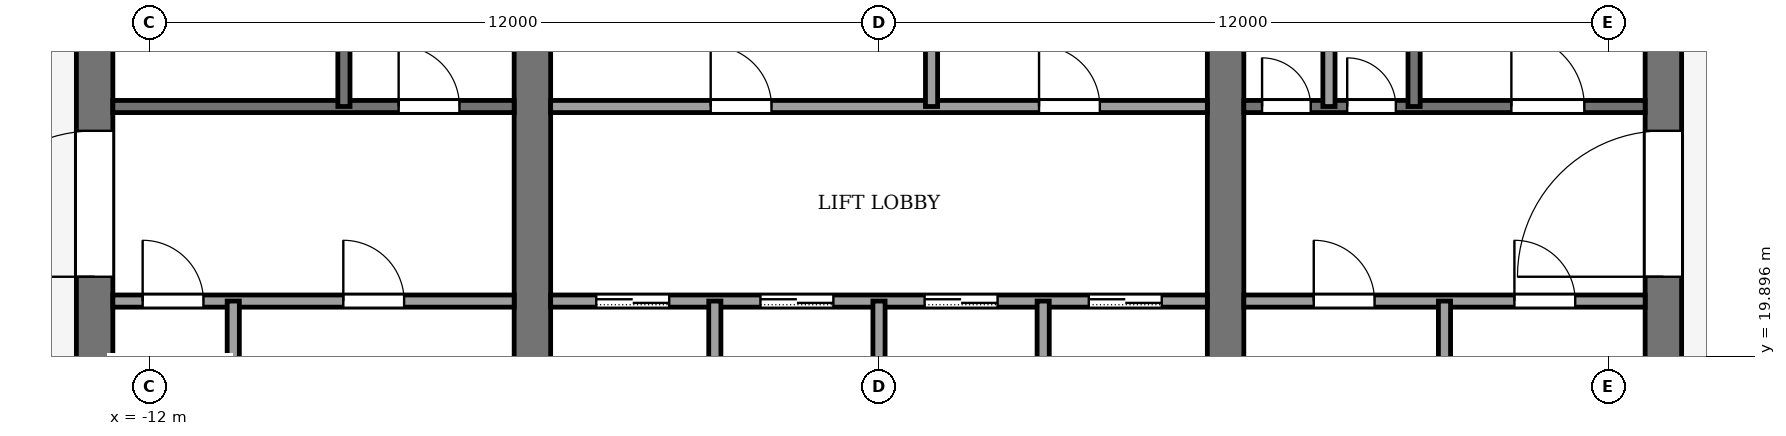
"""IFC4 building model, lengths in metres.
Left out: names, types, materials, properties, quantities, classifications, styles, units other than length and angle.
Written with IfcOpenShell. Run it as: python <this file> out.ifc"""

import sys

from ifc_helpers import new_model, si_unit, direction, frame, frame_2d, origin, place, context, subcontext, project, spatial, rectangle, extrude, element, fill, save


model = new_model("IFC4")
c1 = context("Model", 3, precision=1e-05, world=origin(), true_north=direction((0.0, 1.0)))
c2 = subcontext(c1, "Body", "Model", "MODEL_VIEW")
j1 = project(units=[si_unit("LENGTHUNIT", "METRE"), si_unit("PLANEANGLEUNIT", "RADIAN")], contexts=[c1])
p1 = place(None, origin())
s1 = spatial("IfcSite", under=j1, at=p1, CompositionType="ELEMENT")
p2 = place(p1, origin())
s2 = spatial("IfcBuilding", under=s1, at=p2, CompositionType="ELEMENT")
p3 = place(p2, frame((0.0, 0.0, 294.0)))
s3 = spatial("IfcBuildingStorey", under=s2, at=p3, CompositionType="ELEMENT", Elevation=294.0)
p4 = place(p3, frame((-12.9, 18.4, -0.13), z_axis=(0.0, 0.0, 1.0), x_axis=(0.0, 1.0, 0.0)))
e1 = element("IfcWall", 1, at=p4, inside=s3, PredefinedType="SHEAR", context=c2, shape_type="SweptSolid", body=[
    extrude(rectangle(XDim=19.2, YDim=0.6, at=frame_2d((9.6, 0.0))), origin(), (0.0, 0.0, 1.0), 4.0),
])
p5 = place(p4, frame((2.8, 0.0, 0.13)))
e2 = element("IfcOpeningElement", 2, at=p5, cuts=e1, PredefinedType="OPENING", context=c2, shape_type="SweptSolid", body=[
    extrude(rectangle(XDim=2.4, YDim=2.4, at=frame_2d((1.2, 1.2))), frame((0.0, 0.31, 0.0), z_axis=(0.0, -1.0, 0.0), x_axis=(1.0, 0.0, 0.0)), (0.0, 0.0, 1.0), 0.62),
])
p6 = place(p4, frame((13.4, 0.0, 0.13)))
e3 = element("IfcOpeningElement", 3, at=p6, cuts=e1, PredefinedType="OPENING", context=c2, shape_type="SweptSolid", body=[
    extrude(rectangle(XDim=1.4, YDim=2.2, at=frame_2d((0.7, 1.1))), frame((0.0, 0.31, 0.0), z_axis=(0.0, -1.0, 0.0), x_axis=(1.0, 0.0, 0.0)), (0.0, 0.0, 1.0), 0.62),
])
p7 = place(p3, frame((12.9, 18.4, -0.13), z_axis=(0.0, 0.0, 1.0), x_axis=(0.0, 1.0, 0.0)))
e4 = element("IfcWall", 4, at=p7, inside=s3, PredefinedType="SHEAR", context=c2, shape_type="SweptSolid", body=[
    extrude(rectangle(XDim=19.2, YDim=0.6, at=frame_2d((9.6, 0.0))), origin(), (0.0, 0.0, 1.0), 4.0),
])
p8 = place(p7, frame((2.8, 0.0, 0.13)))
e5 = element("IfcOpeningElement", 5, at=p8, cuts=e4, PredefinedType="OPENING", context=c2, shape_type="SweptSolid", body=[
    extrude(rectangle(XDim=2.4, YDim=2.4, at=frame_2d((1.2, 1.2))), frame((0.0, 0.31, 0.0), z_axis=(0.0, -1.0, 0.0), x_axis=(1.0, 0.0, 0.0)), (0.0, 0.0, 1.0), 0.62),
])
p9 = place(p7, frame((13.3, 0.0, 0.13)))
e6 = element("IfcOpeningElement", 6, at=p9, cuts=e4, PredefinedType="OPENING", context=c2, shape_type="SweptSolid", body=[
    extrude(rectangle(XDim=2.4, YDim=2.4, at=frame_2d((1.2, 1.2))), frame((0.0, 0.31, 0.0), z_axis=(0.0, -1.0, 0.0), x_axis=(1.0, 0.0, 0.0)), (0.0, 0.0, 1.0), 0.62),
])
p10 = place(p3, frame((-5.7, 18.4, -0.13), z_axis=(0.0, 0.0, 1.0), x_axis=(0.0, 1.0, 0.0)))
e7 = element("IfcWall", 7, at=p10, inside=s3, PredefinedType="SHEAR", context=c2, shape_type="SweptSolid", body=[
    extrude(rectangle(XDim=19.2, YDim=0.6, at=frame_2d((9.6, 0.0))), origin(), (0.0, 0.0, 1.0), 4.0),
])
p11 = place(p10, frame((8.35, 0.0, 0.13)))
e8 = element("IfcOpeningElement", 8, at=p11, cuts=e7, PredefinedType="OPENING", context=c2, shape_type="SweptSolid", body=[
    extrude(rectangle(XDim=0.9, YDim=2.1, at=frame_2d((0.45, 1.05))), frame((0.0, 0.31, 0.0), z_axis=(0.0, -1.0, 0.0), x_axis=(1.0, 0.0, 0.0)), (0.0, 0.0, 1.0), 0.62),
])
p12 = place(p3, frame((5.7, 18.4, -0.13), z_axis=(0.0, 0.0, 1.0), x_axis=(0.0, 1.0, 0.0)))
e9 = element("IfcWall", 9, at=p12, inside=s3, PredefinedType="SHEAR", context=c2, shape_type="SweptSolid", body=[
    extrude(rectangle(XDim=19.2, YDim=0.6, at=frame_2d((9.6, 0.0))), origin(), (0.0, 0.0, 1.0), 4.0),
])
p13 = place(p12, frame((13.3, 0.0, 0.13)))
e10 = element("IfcOpeningElement", 10, at=p13, cuts=e9, PredefinedType="OPENING", context=c2, shape_type="SweptSolid", body=[
    extrude(rectangle(XDim=2.4, YDim=2.4, at=frame_2d((1.2, 1.2))), frame((0.0, 0.31, 0.0), z_axis=(0.0, -1.0, 0.0), x_axis=(1.0, 0.0, 0.0)), (0.0, 0.0, 1.0), 0.62),
])
p14 = place(p3, frame((-12.6, 20.8, 0.0), z_axis=(0.0, 0.0, 1.0), x_axis=(1.0, 0.0, 0.0)))
e11 = element("IfcWall", 11, at=p14, inside=s3, PredefinedType="PARTITIONING", context=c2, shape_type="SweptSolid", body=[
    extrude(rectangle(XDim=6.6, YDim=0.2, at=frame_2d((3.3, 0.0))), origin(), (0.0, 0.0, 1.0), 3.87),
])
p15 = place(p14, frame((0.49, 0.0, 0.0)))
e12 = element("IfcOpeningElement", 12, at=p15, cuts=e11, PredefinedType="OPENING", context=c2, shape_type="SweptSolid", body=[
    extrude(rectangle(XDim=1.0, YDim=2.1, at=frame_2d((0.5, 1.05))), frame((0.0, 0.11, 0.0), z_axis=(0.0, -1.0, 0.0), x_axis=(1.0, 0.0, 0.0)), (0.0, 0.0, 1.0), 0.22),
])
p16 = place(p14, frame((3.79, 0.0, 0.0)))
e13 = element("IfcOpeningElement", 13, at=p16, cuts=e11, PredefinedType="OPENING", context=c2, shape_type="SweptSolid", body=[
    extrude(rectangle(XDim=1.0, YDim=2.1, at=frame_2d((0.5, 1.05))), frame((0.0, 0.11, 0.0), z_axis=(0.0, -1.0, 0.0), x_axis=(1.0, 0.0, 0.0)), (0.0, 0.0, 1.0), 0.22),
])
p17 = place(p3, frame((-5.4, 20.8, 0.0), z_axis=(0.0, 0.0, 1.0), x_axis=(1.0, 0.0, 0.0)))
e14 = element("IfcWall", 14, at=p17, inside=s3, PredefinedType="PARTITIONING", context=c2, shape_type="SweptSolid", body=[
    extrude(rectangle(XDim=10.8, YDim=0.2, at=frame_2d((5.4, 0.0))), origin(), (0.0, 0.0, 1.0), 3.87),
])
p18 = place(p17, frame((0.75, 0.0, 0.0)))
e15 = element("IfcOpeningElement", 15, at=p18, cuts=e14, PredefinedType="OPENING", context=c2, shape_type="SweptSolid", body=[
    extrude(rectangle(XDim=1.2, YDim=2.2, at=frame_2d((0.6, 1.1))), frame((0.0, 0.11, 0.0), z_axis=(0.0, -1.0, 0.0), x_axis=(1.0, 0.0, 0.0)), (0.0, 0.0, 1.0), 0.22),
])
p19 = place(p17, frame((3.45, 0.0, 0.0)))
e16 = element("IfcOpeningElement", 16, at=p19, cuts=e14, PredefinedType="OPENING", context=c2, shape_type="SweptSolid", body=[
    extrude(rectangle(XDim=1.2, YDim=2.2, at=frame_2d((0.6, 1.1))), frame((0.0, 0.11, 0.0), z_axis=(0.0, -1.0, 0.0), x_axis=(1.0, 0.0, 0.0)), (0.0, 0.0, 1.0), 0.22),
])
p20 = place(p17, frame((6.15, 0.0, 0.0)))
e17 = element("IfcOpeningElement", 17, at=p20, cuts=e14, PredefinedType="OPENING", context=c2, shape_type="SweptSolid", body=[
    extrude(rectangle(XDim=1.2, YDim=2.2, at=frame_2d((0.6, 1.1))), frame((0.0, 0.11, 0.0), z_axis=(0.0, -1.0, 0.0), x_axis=(1.0, 0.0, 0.0)), (0.0, 0.0, 1.0), 0.22),
])
p21 = place(p17, frame((8.85, 0.0, 0.0)))
e18 = element("IfcOpeningElement", 18, at=p21, cuts=e14, PredefinedType="OPENING", context=c2, shape_type="SweptSolid", body=[
    extrude(rectangle(XDim=1.2, YDim=2.2, at=frame_2d((0.6, 1.1))), frame((0.0, 0.11, 0.0), z_axis=(0.0, -1.0, 0.0), x_axis=(1.0, 0.0, 0.0)), (0.0, 0.0, 1.0), 0.22),
])
p22 = place(p3, frame((6.0, 20.8, 0.0), z_axis=(0.0, 0.0, 1.0), x_axis=(1.0, 0.0, 0.0)))
e19 = element("IfcWall", 19, at=p22, inside=s3, PredefinedType="PARTITIONING", context=c2, shape_type="SweptSolid", body=[
    extrude(rectangle(XDim=6.6, YDim=0.2, at=frame_2d((3.3, 0.0))), origin(), (0.0, 0.0, 1.0), 3.87),
])
p23 = place(p22, frame((1.15, 0.0, 0.0)))
e20 = element("IfcOpeningElement", 20, at=p23, cuts=e19, PredefinedType="OPENING", context=c2, shape_type="SweptSolid", body=[
    extrude(rectangle(XDim=1.0, YDim=2.1, at=frame_2d((0.5, 1.05))), frame((0.0, 0.11, 0.0), z_axis=(0.0, -1.0, 0.0), x_axis=(1.0, 0.0, 0.0)), (0.0, 0.0, 1.0), 0.22),
])
p24 = place(p22, frame((4.45, 0.0, 0.0)))
e21 = element("IfcOpeningElement", 21, at=p24, cuts=e19, PredefinedType="OPENING", context=c2, shape_type="SweptSolid", body=[
    extrude(rectangle(XDim=1.0, YDim=2.1, at=frame_2d((0.5, 1.05))), frame((0.0, 0.11, 0.0), z_axis=(0.0, -1.0, 0.0), x_axis=(1.0, 0.0, 0.0)), (0.0, 0.0, 1.0), 0.22),
])
p25 = place(p3, frame((-12.6, 24.0, 0.0), z_axis=(0.0, 0.0, 1.0), x_axis=(1.0, 0.0, 0.0)))
e22 = element("IfcWall", 22, at=p25, inside=s3, PredefinedType="PARTITIONING", context=c2, shape_type="SweptSolid", body=[
    extrude(rectangle(XDim=6.6, YDim=0.2, at=frame_2d((3.3, 0.0))), origin(), (0.0, 0.0, 1.0), 3.87),
])
p26 = place(p25, frame((4.7, 0.0, 0.0)))
e23 = element("IfcOpeningElement", 23, at=p26, cuts=e22, PredefinedType="OPENING", context=c2, shape_type="SweptSolid", body=[
    extrude(rectangle(XDim=1.0, YDim=2.1, at=frame_2d((0.5, 1.05))), frame((0.0, 0.11, 0.0), z_axis=(0.0, -1.0, 0.0), x_axis=(1.0, 0.0, 0.0)), (0.0, 0.0, 1.0), 0.22),
])
p27 = place(p3, frame((-5.4, 24.0, 0.0), z_axis=(0.0, 0.0, 1.0), x_axis=(1.0, 0.0, 0.0)))
e24 = element("IfcWall", 24, at=p27, inside=s3, PredefinedType="PARTITIONING", context=c2, shape_type="SweptSolid", body=[
    extrude(rectangle(XDim=10.8, YDim=0.2, at=frame_2d((5.4, 0.0))), origin(), (0.0, 0.0, 1.0), 3.87),
])
p28 = place(p27, frame((2.632, 0.0, 0.0)))
e25 = element("IfcOpeningElement", 25, at=p28, cuts=e24, PredefinedType="OPENING", context=c2, shape_type="SweptSolid", body=[
    extrude(rectangle(XDim=1.0, YDim=2.1, at=frame_2d((0.5, 1.05))), frame((0.0, 0.11, 0.0), z_axis=(0.0, -1.0, 0.0), x_axis=(1.0, 0.0, 0.0)), (0.0, 0.0, 1.0), 0.22),
])
p29 = place(p27, frame((8.032, 0.0, 0.0)))
e26 = element("IfcOpeningElement", 26, at=p29, cuts=e24, PredefinedType="OPENING", context=c2, shape_type="SweptSolid", body=[
    extrude(rectangle(XDim=1.0, YDim=2.1, at=frame_2d((0.5, 1.05))), frame((0.0, 0.11, 0.0), z_axis=(0.0, -1.0, 0.0), x_axis=(1.0, 0.0, 0.0)), (0.0, 0.0, 1.0), 0.22),
])
p30 = place(p3, frame((6.0, 24.0, 0.0), z_axis=(0.0, 0.0, 1.0), x_axis=(1.0, 0.0, 0.0)))
e27 = element("IfcWall", 27, at=p30, inside=s3, PredefinedType="PARTITIONING", context=c2, shape_type="SweptSolid", body=[
    extrude(rectangle(XDim=6.6, YDim=0.2, at=frame_2d((3.3, 0.0))), origin(), (0.0, 0.0, 1.0), 3.87),
])
p31 = place(p30, frame((0.3, 0.0, 0.0)))
e28 = element("IfcOpeningElement", 28, at=p31, cuts=e27, PredefinedType="OPENING", context=c2, shape_type="SweptSolid", body=[
    extrude(rectangle(XDim=0.8, YDim=2.1, at=frame_2d((0.4, 1.05))), frame((0.0, 0.11, 0.0), z_axis=(0.0, -1.0, 0.0), x_axis=(1.0, 0.0, 0.0)), (0.0, 0.0, 1.0), 0.22),
])
p32 = place(p30, frame((1.7, 0.0, 0.0)))
e29 = element("IfcOpeningElement", 29, at=p32, cuts=e27, PredefinedType="OPENING", context=c2, shape_type="SweptSolid", body=[
    extrude(rectangle(XDim=0.8, YDim=2.1, at=frame_2d((0.4, 1.05))), frame((0.0, 0.11, 0.0), z_axis=(0.0, -1.0, 0.0), x_axis=(1.0, 0.0, 0.0)), (0.0, 0.0, 1.0), 0.22),
])
p33 = place(p30, frame((4.4, 0.0, 0.0)))
e30 = element("IfcOpeningElement", 30, at=p33, cuts=e27, PredefinedType="OPENING", context=c2, shape_type="SweptSolid", body=[
    extrude(rectangle(XDim=1.2, YDim=2.2, at=frame_2d((0.6, 1.1))), frame((0.0, 0.11, 0.0), z_axis=(0.0, -1.0, 0.0), x_axis=(1.0, 0.0, 0.0)), (0.0, 0.0, 1.0), 0.22),
])
p34 = place(p3, frame((-10.62, 18.4, 0.0), z_axis=(0.0, 0.0, 1.0), x_axis=(0.0, 1.0, 0.0)))
e31 = element("IfcWall", 31, at=p34, inside=s3, PredefinedType="PARTITIONING", context=c2, shape_type="SweptSolid", body=[
    extrude(rectangle(XDim=2.4, YDim=0.2, at=frame_2d((1.2, 0.0))), origin(), (0.0, 0.0, 1.0), 3.87),
])
p35 = place(p3, frame((-8.8, 24.0, 0.0), z_axis=(0.0, 0.0, 1.0), x_axis=(0.0, 1.0, 0.0)))
e32 = element("IfcWall", 32, at=p35, inside=s3, PredefinedType="PARTITIONING", context=c2, shape_type="SweptSolid", body=[
    extrude(rectangle(XDim=7.4, YDim=0.2, at=frame_2d((3.7, 0.0))), origin(), (0.0, 0.0, 1.0), 3.87),
])
for number, where, z_axis, x_axis in (
    (33, (-2.7, 18.4, 0.0), (0.0, 0.0, 1.0), (0.0, 1.0, 0.0)),
    (34, (0.0, 18.4, 0.0), (0.0, 0.0, 1.0), (0.0, 1.0, 0.0)),
):
    element("IfcWall", number, at=place(p3, frame(where, z_axis=z_axis, x_axis=x_axis)), inside=s3, PredefinedType="PARTITIONING", context=c2, shape_type="SweptSolid", body=[
        extrude(rectangle(XDim=2.4, YDim=0.2, at=frame_2d((1.2, 0.0))), origin(), (0.0, 0.0, 1.0), 3.87),
    ])
p36 = place(p3, frame((0.864, 24.0, 0.0), z_axis=(0.0, 0.0, 1.0), x_axis=(0.0, 1.0, 0.0)))
e35 = element("IfcWall", 35, at=p36, inside=s3, PredefinedType="PARTITIONING", context=c2, shape_type="SweptSolid", body=[
    extrude(rectangle(XDim=2.4, YDim=0.2, at=frame_2d((1.2, 0.0))), origin(), (0.0, 0.0, 1.0), 3.87),
])
p37 = place(p3, frame((2.7, 18.4, 0.0), z_axis=(0.0, 0.0, 1.0), x_axis=(0.0, 1.0, 0.0)))
e36 = element("IfcWall", 36, at=p37, inside=s3, PredefinedType="PARTITIONING", context=c2, shape_type="SweptSolid", body=[
    extrude(rectangle(XDim=2.4, YDim=0.2, at=frame_2d((1.2, 0.0))), origin(), (0.0, 0.0, 1.0), 3.87),
])
for number, where, z_axis, x_axis in (
    (37, (7.4, 24.0, 0.0), (0.0, 0.0, 1.0), (0.0, 1.0, 0.0)),
    (38, (8.8, 24.0, 0.0), (0.0, 0.0, 1.0), (0.0, 1.0, 0.0)),
):
    element("IfcWall", number, at=place(p3, frame(where, z_axis=z_axis, x_axis=x_axis)), inside=s3, PredefinedType="PARTITIONING", context=c2, shape_type="SweptSolid", body=[
        extrude(rectangle(XDim=7.4, YDim=0.2, at=frame_2d((3.7, 0.0))), origin(), (0.0, 0.0, 1.0), 3.87),
    ])
p38 = place(p3, frame((9.3, 18.4, 0.0), z_axis=(0.0, 0.0, 1.0), x_axis=(0.0, 1.0, 0.0)))
e39 = element("IfcWall", 39, at=p38, inside=s3, PredefinedType="PARTITIONING", context=c2, shape_type="SweptSolid", body=[
    extrude(rectangle(XDim=2.4, YDim=0.2, at=frame_2d((1.2, 0.0))), origin(), (0.0, 0.0, 1.0), 3.87),
])
p39 = place(p18, origin())
e40 = element("IfcDoor", 40, at=p39, inside=s3, OperationType="SLIDING_TO_LEFT", PredefinedType="DOOR", context=c2, shape_type="SweptSolid", body=[
    extrude(rectangle(XDim=1.2, YDim=2.2, at=frame_2d((0.6, 1.1))), frame((0.0, 0.025, 0.0), z_axis=(0.0, -1.0, 0.0), x_axis=(1.0, 0.0, 0.0)), (0.0, 0.0, 1.0), 0.05),
])
fill(e15, e40)
p40 = place(p19, origin())
e41 = element("IfcDoor", 41, at=p40, inside=s3, OperationType="SLIDING_TO_LEFT", PredefinedType="DOOR", context=c2, shape_type="SweptSolid", body=[
    extrude(rectangle(XDim=1.2, YDim=2.2, at=frame_2d((0.6, 1.1))), frame((0.0, 0.025, 0.0), z_axis=(0.0, -1.0, 0.0), x_axis=(1.0, 0.0, 0.0)), (0.0, 0.0, 1.0), 0.05),
])
fill(e16, e41)
p41 = place(p20, origin())
e42 = element("IfcDoor", 42, at=p41, inside=s3, OperationType="SLIDING_TO_LEFT", PredefinedType="DOOR", context=c2, shape_type="SweptSolid", body=[
    extrude(rectangle(XDim=1.2, YDim=2.2, at=frame_2d((0.6, 1.1))), frame((0.0, 0.025, 0.0), z_axis=(0.0, -1.0, 0.0), x_axis=(1.0, 0.0, 0.0)), (0.0, 0.0, 1.0), 0.05),
])
fill(e17, e42)
p42 = place(p21, origin())
e43 = element("IfcDoor", 43, at=p42, inside=s3, OperationType="SLIDING_TO_LEFT", PredefinedType="DOOR", context=c2, shape_type="SweptSolid", body=[
    extrude(rectangle(XDim=1.2, YDim=2.2, at=frame_2d((0.6, 1.1))), frame((0.0, 0.025, 0.0), z_axis=(0.0, -1.0, 0.0), x_axis=(1.0, 0.0, 0.0)), (0.0, 0.0, 1.0), 0.05),
])
fill(e18, e43)
p43 = place(p28, origin())
e44 = element("IfcDoor", 44, at=p43, inside=s3, OperationType="SINGLE_SWING_LEFT", PredefinedType="DOOR", context=c2, shape_type="SweptSolid", body=[
    extrude(rectangle(XDim=1.0, YDim=2.1, at=frame_2d((0.5, 1.05))), frame((0.0, 0.025, 0.0), z_axis=(0.0, -1.0, 0.0), x_axis=(1.0, 0.0, 0.0)), (0.0, 0.0, 1.0), 0.05),
])
fill(e25, e44)
p44 = place(p29, origin())
e45 = element("IfcDoor", 45, at=p44, inside=s3, OperationType="SINGLE_SWING_RIGHT", PredefinedType="DOOR", context=c2, shape_type="SweptSolid", body=[
    extrude(rectangle(XDim=1.0, YDim=2.1, at=frame_2d((0.5, 1.05))), frame((0.0, 0.025, 0.0), z_axis=(0.0, -1.0, 0.0), x_axis=(1.0, 0.0, 0.0)), (0.0, 0.0, 1.0), 0.05),
])
fill(e26, e45)
p45 = place(p15, origin())
e46 = element("IfcDoor", 46, at=p45, inside=s3, OperationType="SINGLE_SWING_RIGHT", PredefinedType="DOOR", context=c2, shape_type="SweptSolid", body=[
    extrude(rectangle(XDim=1.0, YDim=2.1, at=frame_2d((0.5, 1.05))), frame((0.0, 0.025, 0.0), z_axis=(0.0, -1.0, 0.0), x_axis=(1.0, 0.0, 0.0)), (0.0, 0.0, 1.0), 0.05),
])
fill(e12, e46)
p46 = place(p16, origin())
e47 = element("IfcDoor", 47, at=p46, inside=s3, OperationType="SINGLE_SWING_RIGHT", PredefinedType="DOOR", context=c2, shape_type="SweptSolid", body=[
    extrude(rectangle(XDim=1.0, YDim=2.1, at=frame_2d((0.5, 1.05))), frame((0.0, 0.025, 0.0), z_axis=(0.0, -1.0, 0.0), x_axis=(1.0, 0.0, 0.0)), (0.0, 0.0, 1.0), 0.05),
])
fill(e13, e47)
p47 = place(p23, origin())
e48 = element("IfcDoor", 48, at=p47, inside=s3, OperationType="SINGLE_SWING_LEFT", PredefinedType="DOOR", context=c2, shape_type="SweptSolid", body=[
    extrude(rectangle(XDim=1.0, YDim=2.1, at=frame_2d((0.5, 1.05))), frame((0.0, 0.025, 0.0), z_axis=(0.0, -1.0, 0.0), x_axis=(1.0, 0.0, 0.0)), (0.0, 0.0, 1.0), 0.05),
])
fill(e20, e48)
p48 = place(p24, origin())
e49 = element("IfcDoor", 49, at=p48, inside=s3, OperationType="SINGLE_SWING_LEFT", PredefinedType="DOOR", context=c2, shape_type="SweptSolid", body=[
    extrude(rectangle(XDim=1.0, YDim=2.1, at=frame_2d((0.5, 1.05))), frame((0.0, 0.025, 0.0), z_axis=(0.0, -1.0, 0.0), x_axis=(1.0, 0.0, 0.0)), (0.0, 0.0, 1.0), 0.05),
])
fill(e21, e49)
p49 = place(p26, origin())
e50 = element("IfcDoor", 50, at=p49, inside=s3, OperationType="SINGLE_SWING_RIGHT", PredefinedType="DOOR", context=c2, shape_type="SweptSolid", body=[
    extrude(rectangle(XDim=1.0, YDim=2.1, at=frame_2d((0.5, 1.05))), frame((0.0, 0.025, 0.0), z_axis=(0.0, -1.0, 0.0), x_axis=(1.0, 0.0, 0.0)), (0.0, 0.0, 1.0), 0.05),
])
fill(e23, e50)
p50 = place(p31, origin())
e51 = element("IfcDoor", 51, at=p50, inside=s3, OperationType="SINGLE_SWING_RIGHT", PredefinedType="DOOR", context=c2, shape_type="SweptSolid", body=[
    extrude(rectangle(XDim=0.8, YDim=2.1, at=frame_2d((0.4, 1.05))), frame((0.0, 0.025, 0.0), z_axis=(0.0, -1.0, 0.0), x_axis=(1.0, 0.0, 0.0)), (0.0, 0.0, 1.0), 0.05),
])
fill(e28, e51)
p51 = place(p32, origin())
e52 = element("IfcDoor", 52, at=p51, inside=s3, OperationType="SINGLE_SWING_LEFT", PredefinedType="DOOR", context=c2, shape_type="SweptSolid", body=[
    extrude(rectangle(XDim=0.8, YDim=2.1, at=frame_2d((0.4, 1.05))), frame((0.0, 0.025, 0.0), z_axis=(0.0, -1.0, 0.0), x_axis=(1.0, 0.0, 0.0)), (0.0, 0.0, 1.0), 0.05),
])
fill(e29, e52)
p52 = place(p33, origin())
e53 = element("IfcDoor", 53, at=p52, inside=s3, OperationType="SINGLE_SWING_RIGHT", PredefinedType="DOOR", context=c2, shape_type="SweptSolid", body=[
    extrude(rectangle(XDim=1.2, YDim=2.2, at=frame_2d((0.6, 1.1))), frame((0.0, 0.025, 0.0), z_axis=(0.0, -1.0, 0.0), x_axis=(1.0, 0.0, 0.0)), (0.0, 0.0, 1.0), 0.05),
])
fill(e30, e53)
p53 = place(p5, origin())
e54 = element("IfcDoor", 54, at=p53, inside=s3, OperationType="DOUBLE_DOOR_SINGLE_SWING", PredefinedType="DOOR", context=c2, shape_type="SweptSolid", body=[
    extrude(rectangle(XDim=2.4, YDim=2.4, at=frame_2d((1.2, 1.2))), frame((0.0, 0.025, 0.0), z_axis=(0.0, -1.0, 0.0), x_axis=(1.0, 0.0, 0.0)), (0.0, 0.0, 1.0), 0.05),
])
fill(e2, e54)
p54 = place(p8, origin())
e55 = element("IfcDoor", 55, at=p54, inside=s3, OperationType="DOUBLE_DOOR_SINGLE_SWING", PredefinedType="DOOR", context=c2, shape_type="SweptSolid", body=[
    extrude(rectangle(XDim=2.4, YDim=2.4, at=frame_2d((1.2, 1.2))), frame((0.0, 0.025, 0.0), z_axis=(0.0, -1.0, 0.0), x_axis=(1.0, 0.0, 0.0)), (0.0, 0.0, 1.0), 0.05),
])
fill(e5, e55)
save(model, sys.argv[1])
